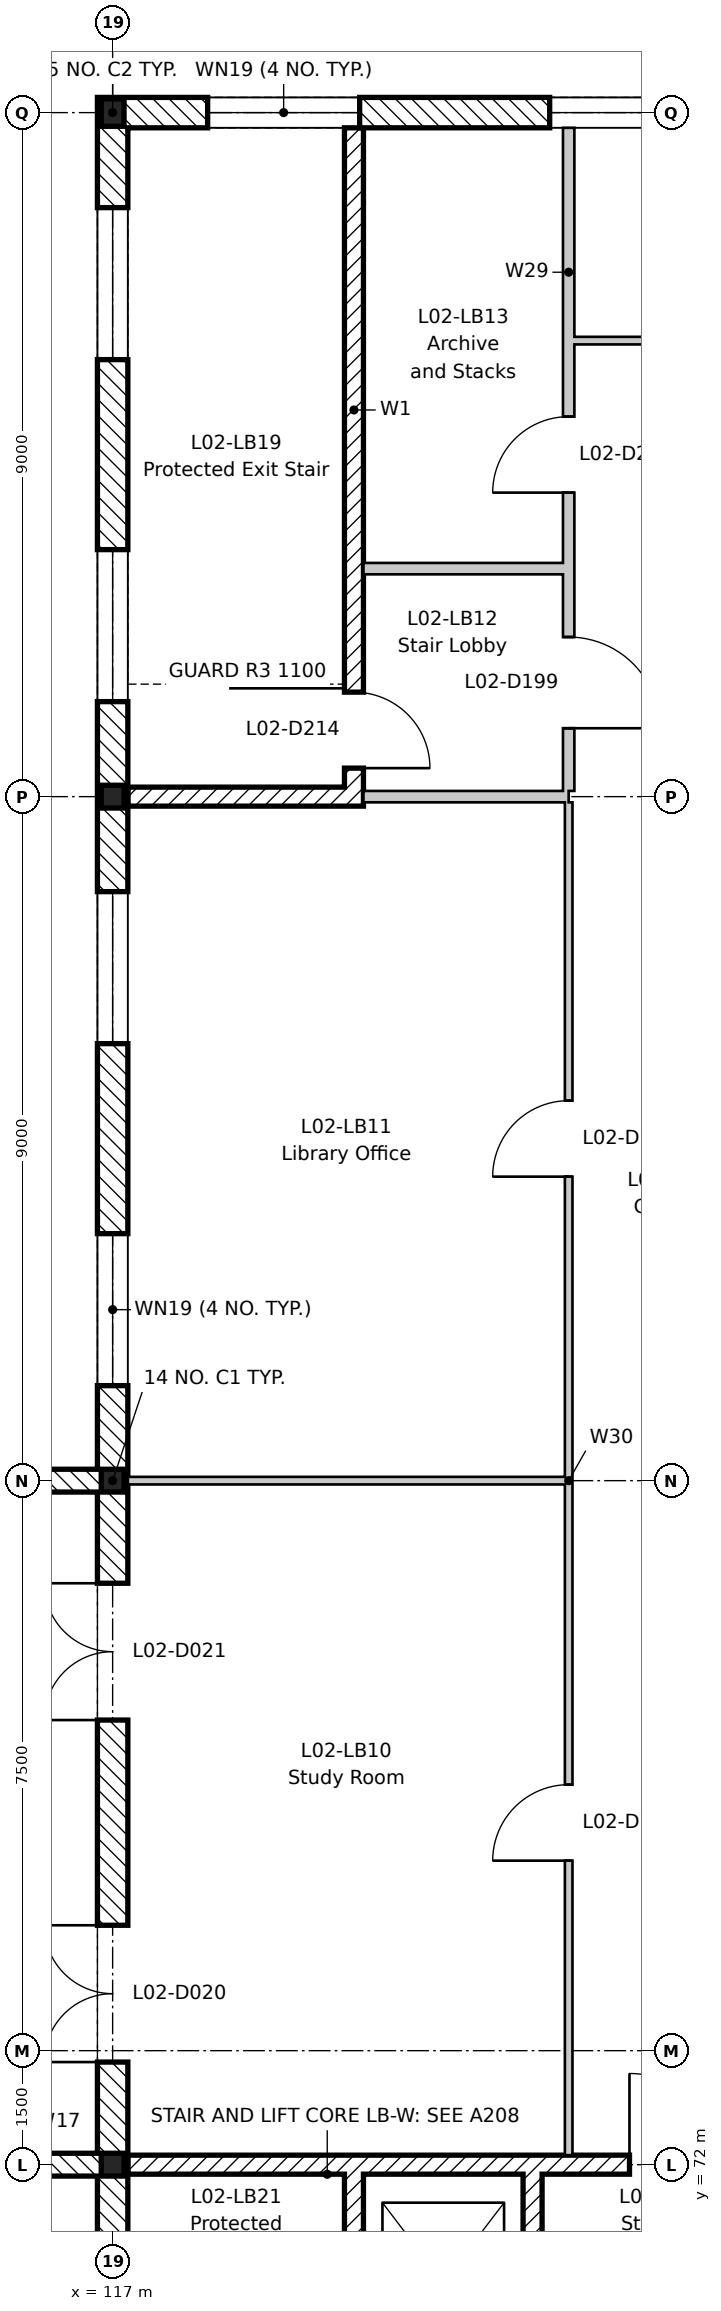
"""IFC4 building model, lengths in metres.
Left out: names, types, materials, properties, quantities, classifications, styles, units other than length and angle.
Written with IfcOpenShell. Run it as: python <this file> out.ifc"""

import sys

from ifc_helpers import new_model, si_unit, direction, frame, frame_2d, origin, origin_2d, place, context, subcontext, project, spatial, rectangle, i_section, extrude, element, fill, save


model = new_model("IFC4")
c1 = context("Model", 3, precision=1e-05, world=origin(), true_north=direction((0.0, 1.0)))
c2 = subcontext(c1, "Body", "Model", "MODEL_VIEW")
j1 = project(units=[si_unit("LENGTHUNIT", "METRE"), si_unit("PLANEANGLEUNIT", "RADIAN")], contexts=[c1])
p1 = place(None, origin())
s1 = spatial("IfcSite", under=j1, at=p1, CompositionType="ELEMENT")
p2 = place(p1, origin())
s2 = spatial("IfcBuilding", under=s1, at=p2, CompositionType="ELEMENT")
p3 = place(p2, frame((0.0, 0.0, 9.9)))
s3 = spatial("IfcBuildingStorey", under=s2, at=p3, CompositionType="ELEMENT", Elevation=9.9)
for number, where, z_axis, x_axis in (
    (1, (117.0, 72.0, -0.2), (0.0, 0.0, 1.0), (1.0, 0.0, 0.0)),
    (2, (117.0, 81.0, -0.2), (0.0, 0.0, 1.0), (1.0, 0.0, 0.0)),
    (3, (117.0, 90.0, -0.2), (0.0, 0.0, 1.0), (1.0, 0.0, 0.0)),
):
    element("IfcColumn", number, at=place(p3, frame(where, z_axis=z_axis, x_axis=x_axis)), inside=s3, PredefinedType="COLUMN", context=c2, shape_type="SweptSolid", body=[
        extrude(i_section(OverallWidth=0.3, OverallDepth=0.3, WebThickness=0.011, FlangeThickness=0.019, FilletRadius=0.027, at=origin_2d()), origin(), (0.0, 0.0, 1.0), 4.45),
    ])
p4 = place(p3, frame((117.0, 99.0, -0.2), z_axis=(0.0, 0.0, 1.0), x_axis=(1.0, 0.0, 0.0)))
e4 = element("IfcColumn", 4, at=p4, inside=s3, PredefinedType="COLUMN", context=c2, shape_type="SweptSolid", body=[
    extrude(i_section(OverallWidth=0.3, OverallDepth=0.36, WebThickness=0.012, FlangeThickness=0.022, FilletRadius=0.027, at=origin_2d()), origin(), (0.0, 0.0, 1.0), 4.45),
])
p5 = place(p3, frame((120.175, 63.2, 0.0), z_axis=(0.0, 0.0, 1.0), x_axis=(0.0, 1.0, 0.0)))
e5 = element("IfcWall", 5, at=p5, inside=s3, PredefinedType="SHEAR", context=c2, shape_type="SweptSolid", body=[
    extrude(rectangle(XDim=8.675, YDim=0.25, at=frame_2d((4.337, 0.0))), origin(), (0.0, 0.0, 1.0), 4.25),
])
p6 = place(p5, frame((0.25, 0.0, 0.0)))
e6 = element("IfcOpeningElement", 6, at=p6, cuts=e5, PredefinedType="OPENING", context=c2, shape_type="SweptSolid", body=[
    extrude(rectangle(XDim=1.0, YDim=2.1, at=frame_2d((0.5, 1.05))), frame((0.0, 0.135, 0.0), z_axis=(0.0, -1.0, 0.0), x_axis=(1.0, 0.0, 0.0)), (0.0, 0.0, 1.0), 0.27),
])
p7 = place(p3, frame((117.2, 72.0, 0.0), z_axis=(0.0, 0.0, 1.0), x_axis=(1.0, 0.0, 0.0)))
e7 = element("IfcWall", 7, at=p7, inside=s3, PredefinedType="SHEAR", context=c2, shape_type="SweptSolid", body=[
    extrude(rectangle(XDim=8.65, YDim=0.25, at=frame_2d((4.325, 0.0))), origin(), (0.0, 0.0, 1.0), 4.25),
])
p8 = place(p7, frame((6.6, 0.0, 0.0)))
e8 = element("IfcOpeningElement", 8, at=p8, cuts=e7, PredefinedType="OPENING", context=c2, shape_type="SweptSolid", body=[
    extrude(rectangle(XDim=1.2, YDim=2.1, at=frame_2d((0.6, 1.05))), frame((0.0, 0.135, 0.0), z_axis=(0.0, -1.0, 0.0), x_axis=(1.0, 0.0, 0.0)), (0.0, 0.0, 1.0), 0.27),
])
p9 = place(p3, frame((122.525, 69.275, 0.0), z_axis=(0.0, 0.0, 1.0), x_axis=(0.0, 1.0, 0.0)))
e9 = element("IfcWall", 9, at=p9, inside=s3, PredefinedType="SHEAR", context=c2, shape_type="SweptSolid", body=[
    extrude(rectangle(XDim=2.6, YDim=0.25, at=frame_2d((1.3, 0.0))), origin(), (0.0, 0.0, 1.0), 4.25),
])
p10 = place(p3, frame((120.175, 90.125, 0.0), z_axis=(0.0, 0.0, 1.0), x_axis=(0.0, 1.0, 0.0)))
e10 = element("IfcWall", 10, at=p10, inside=s3, PredefinedType="SHEAR", context=c2, shape_type="SweptSolid", body=[
    extrude(rectangle(XDim=8.675, YDim=0.25, at=frame_2d((4.337, 0.0))), origin(), (0.0, 0.0, 1.0), 4.25),
])
p11 = place(p10, frame((0.25, 0.0, 0.0)))
e11 = element("IfcOpeningElement", 11, at=p11, cuts=e10, PredefinedType="OPENING", context=c2, shape_type="SweptSolid", body=[
    extrude(rectangle(XDim=1.0, YDim=2.1, at=frame_2d((0.5, 1.05))), frame((0.0, 0.135, 0.0), z_axis=(0.0, -1.0, 0.0), x_axis=(1.0, 0.0, 0.0)), (0.0, 0.0, 1.0), 0.27),
])
p12 = place(p3, frame((117.2, 90.0, 0.0), z_axis=(0.0, 0.0, 1.0), x_axis=(1.0, 0.0, 0.0)))
e12 = element("IfcWall", 12, at=p12, inside=s3, PredefinedType="SHEAR", context=c2, shape_type="SweptSolid", body=[
    extrude(rectangle(XDim=3.1, YDim=0.25, at=frame_2d((1.55, 0.0))), origin(), (0.0, 0.0, 1.0), 4.25),
])
for number, where, z_axis, x_axis in (
    (13, (116.85, 72.0, 0.0), (0.0, 0.0, 1.0), (-1.0, 0.0, 0.0)),
    (14, (116.85, 81.0, 0.0), (0.0, 0.0, 1.0), (-1.0, 0.0, 0.0)),
):
    element("IfcWall", number, at=place(p3, frame(where, z_axis=z_axis, x_axis=x_axis)), inside=s3, PredefinedType="STANDARD", context=c2, shape_type="SweptSolid", body=[
        extrude(rectangle(XDim=2.25, YDim=0.3, at=frame_2d((1.125, 0.0))), origin(), (0.0, 0.0, 1.0), 3.97),
    ])
p13 = place(p3, frame((116.8, 99.0, 0.0), z_axis=(0.0, 0.0, 1.0), x_axis=(1.0, 0.0, 0.0)))
e15 = element("IfcWall", 15, at=p13, inside=s3, PredefinedType="STANDARD", context=c2, shape_type="SweptSolid", body=[
    extrude(rectangle(XDim=54.4, YDim=0.4, at=frame_2d((27.2, 0.0))), origin(), (0.0, 0.0, 1.0), 4.25),
])
p14 = place(p13, frame((1.45, 0.0, 0.5)))
e16 = element("IfcOpeningElement", 16, at=p14, cuts=e15, PredefinedType="OPENING", context=c2, shape_type="SweptSolid", body=[
    extrude(rectangle(XDim=2.0, YDim=3.2, at=frame_2d((1.0, 1.6))), frame((0.0, 0.21, 0.0), z_axis=(0.0, -1.0, 0.0), x_axis=(1.0, 0.0, 0.0)), (0.0, 0.0, 1.0), 0.42),
])
p15 = place(p13, frame((5.95, 0.0, 0.5)))
e17 = element("IfcOpeningElement", 17, at=p15, cuts=e15, PredefinedType="OPENING", context=c2, shape_type="SweptSolid", body=[
    extrude(rectangle(XDim=2.0, YDim=3.2, at=frame_2d((1.0, 1.6))), frame((0.0, 0.21, 0.0), z_axis=(0.0, -1.0, 0.0), x_axis=(1.0, 0.0, 0.0)), (0.0, 0.0, 1.0), 0.42),
])
p16 = place(p13, frame((10.45, 0.0, 0.5)))
e18 = element("IfcOpeningElement", 18, at=p16, cuts=e15, PredefinedType="OPENING", context=c2, shape_type="SweptSolid", body=[
    extrude(rectangle(XDim=2.0, YDim=3.2, at=frame_2d((1.0, 1.6))), frame((0.0, 0.21, 0.0), z_axis=(0.0, -1.0, 0.0), x_axis=(1.0, 0.0, 0.0)), (0.0, 0.0, 1.0), 0.42),
])
p17 = place(p13, frame((14.95, 0.0, 0.5)))
e19 = element("IfcOpeningElement", 19, at=p17, cuts=e15, PredefinedType="OPENING", context=c2, shape_type="SweptSolid", body=[
    extrude(rectangle(XDim=2.0, YDim=3.2, at=frame_2d((1.0, 1.6))), frame((0.0, 0.21, 0.0), z_axis=(0.0, -1.0, 0.0), x_axis=(1.0, 0.0, 0.0)), (0.0, 0.0, 1.0), 0.42),
])
p18 = place(p13, frame((28.45, 0.0, 0.5)))
e20 = element("IfcOpeningElement", 20, at=p18, cuts=e15, PredefinedType="OPENING", context=c2, shape_type="SweptSolid", body=[
    extrude(rectangle(XDim=2.0, YDim=3.2, at=frame_2d((1.0, 1.6))), frame((0.0, 0.21, 0.0), z_axis=(0.0, -1.0, 0.0), x_axis=(1.0, 0.0, 0.0)), (0.0, 0.0, 1.0), 0.42),
])
p19 = place(p13, frame((32.95, 0.0, 0.5)))
e21 = element("IfcOpeningElement", 21, at=p19, cuts=e15, PredefinedType="OPENING", context=c2, shape_type="SweptSolid", body=[
    extrude(rectangle(XDim=2.0, YDim=3.2, at=frame_2d((1.0, 1.6))), frame((0.0, 0.21, 0.0), z_axis=(0.0, -1.0, 0.0), x_axis=(1.0, 0.0, 0.0)), (0.0, 0.0, 1.0), 0.42),
])
p20 = place(p13, frame((37.45, 0.0, 0.5)))
e22 = element("IfcOpeningElement", 22, at=p20, cuts=e15, PredefinedType="OPENING", context=c2, shape_type="SweptSolid", body=[
    extrude(rectangle(XDim=2.0, YDim=3.2, at=frame_2d((1.0, 1.6))), frame((0.0, 0.21, 0.0), z_axis=(0.0, -1.0, 0.0), x_axis=(1.0, 0.0, 0.0)), (0.0, 0.0, 1.0), 0.42),
])
p21 = place(p13, frame((41.95, 0.0, 0.5)))
e23 = element("IfcOpeningElement", 23, at=p21, cuts=e15, PredefinedType="OPENING", context=c2, shape_type="SweptSolid", body=[
    extrude(rectangle(XDim=2.0, YDim=3.2, at=frame_2d((1.0, 1.6))), frame((0.0, 0.21, 0.0), z_axis=(0.0, -1.0, 0.0), x_axis=(1.0, 0.0, 0.0)), (0.0, 0.0, 1.0), 0.42),
])
p22 = place(p13, frame((19.55, 0.0, 0.0)))
e24 = element("IfcOpeningElement", 24, at=p22, cuts=e15, PredefinedType="OPENING", context=c2, shape_type="SweptSolid", body=[
    extrude(rectangle(XDim=1.8, YDim=2.4, at=frame_2d((0.9, 1.2))), frame((0.0, 0.21, 0.0), z_axis=(0.0, -1.0, 0.0), x_axis=(1.0, 0.0, 0.0)), (0.0, 0.0, 1.0), 0.42),
])
p23 = place(p13, frame((24.05, 0.0, 0.0)))
e25 = element("IfcOpeningElement", 25, at=p23, cuts=e15, PredefinedType="OPENING", context=c2, shape_type="SweptSolid", body=[
    extrude(rectangle(XDim=1.8, YDim=2.4, at=frame_2d((0.9, 1.2))), frame((0.0, 0.21, 0.0), z_axis=(0.0, -1.0, 0.0), x_axis=(1.0, 0.0, 0.0)), (0.0, 0.0, 1.0), 0.42),
])
p24 = place(p3, frame((117.0, 63.2, 0.0), z_axis=(0.0, 0.0, 1.0), x_axis=(0.0, 1.0, 0.0)))
e26 = element("IfcWall", 26, at=p24, inside=s3, PredefinedType="STANDARD", context=c2, shape_type="SweptSolid", body=[
    extrude(rectangle(XDim=35.6, YDim=0.4, at=frame_2d((17.8, 0.0))), origin(), (0.0, 0.0, 1.0), 4.25),
])
p25 = place(p24, frame((19.05, 0.0, 0.5)))
e27 = element("IfcOpeningElement", 27, at=p25, cuts=e26, PredefinedType="OPENING", context=c2, shape_type="SweptSolid", body=[
    extrude(rectangle(XDim=2.0, YDim=3.2, at=frame_2d((1.0, 1.6))), frame((0.0, 0.21, 0.0), z_axis=(0.0, -1.0, 0.0), x_axis=(1.0, 0.0, 0.0)), (0.0, 0.0, 1.0), 0.42),
])
p26 = place(p24, frame((23.55, 0.0, 0.5)))
e28 = element("IfcOpeningElement", 28, at=p26, cuts=e26, PredefinedType="OPENING", context=c2, shape_type="SweptSolid", body=[
    extrude(rectangle(XDim=2.0, YDim=3.2, at=frame_2d((1.0, 1.6))), frame((0.0, 0.21, 0.0), z_axis=(0.0, -1.0, 0.0), x_axis=(1.0, 0.0, 0.0)), (0.0, 0.0, 1.0), 0.42),
])
p27 = place(p24, frame((28.05, 0.0, 0.5)))
e29 = element("IfcOpeningElement", 29, at=p27, cuts=e26, PredefinedType="OPENING", context=c2, shape_type="SweptSolid", body=[
    extrude(rectangle(XDim=2.0, YDim=3.2, at=frame_2d((1.0, 1.6))), frame((0.0, 0.21, 0.0), z_axis=(0.0, -1.0, 0.0), x_axis=(1.0, 0.0, 0.0)), (0.0, 0.0, 1.0), 0.42),
])
p28 = place(p24, frame((32.55, 0.0, 0.5)))
e30 = element("IfcOpeningElement", 30, at=p28, cuts=e26, PredefinedType="OPENING", context=c2, shape_type="SweptSolid", body=[
    extrude(rectangle(XDim=2.0, YDim=3.2, at=frame_2d((1.0, 1.6))), frame((0.0, 0.21, 0.0), z_axis=(0.0, -1.0, 0.0), x_axis=(1.0, 0.0, 0.0)), (0.0, 0.0, 1.0), 0.42),
])
p29 = place(p24, frame((10.15, 0.0, 0.0)))
e31 = element("IfcOpeningElement", 31, at=p29, cuts=e26, PredefinedType="OPENING", context=c2, shape_type="SweptSolid", body=[
    extrude(rectangle(XDim=1.8, YDim=2.4, at=frame_2d((0.9, 1.2))), frame((0.0, 0.21, 0.0), z_axis=(0.0, -1.0, 0.0), x_axis=(1.0, 0.0, 0.0)), (0.0, 0.0, 1.0), 0.42),
])
p30 = place(p24, frame((14.65, 0.0, 0.0)))
e32 = element("IfcOpeningElement", 32, at=p30, cuts=e26, PredefinedType="OPENING", context=c2, shape_type="SweptSolid", body=[
    extrude(rectangle(XDim=1.8, YDim=2.4, at=frame_2d((0.9, 1.2))), frame((0.0, 0.21, 0.0), z_axis=(0.0, -1.0, 0.0), x_axis=(1.0, 0.0, 0.0)), (0.0, 0.0, 1.0), 0.42),
])
p31 = place(p3, frame((117.2, 81.0, 0.0), z_axis=(0.0, 0.0, 1.0), x_axis=(1.0, 0.0, 0.0)))
e33 = element("IfcWall", 33, at=p31, inside=s3, PredefinedType="PARTITIONING", context=c2, shape_type="SweptSolid", body=[
    extrude(rectangle(XDim=5.75, YDim=0.1, at=frame_2d((2.875, 0.0))), origin(), (0.0, 0.0, 1.0), 4.25),
])
p32 = place(p3, frame((120.3, 90.0, 0.0), z_axis=(0.0, 0.0, 1.0), x_axis=(1.0, 0.0, 0.0)))
e34 = element("IfcWall", 34, at=p32, inside=s3, PredefinedType="PARTITIONING", context=c2, shape_type="SweptSolid", body=[
    extrude(rectangle(XDim=2.7, YDim=0.15, at=frame_2d((1.35, 0.0))), origin(), (0.0, 0.0, 1.0), 4.25),
])
p33 = place(p3, frame((120.3, 93.0, 0.0), z_axis=(0.0, 0.0, 1.0), x_axis=(1.0, 0.0, 0.0)))
e35 = element("IfcWall", 35, at=p33, inside=s3, PredefinedType="PARTITIONING", context=c2, shape_type="SweptSolid", body=[
    extrude(rectangle(XDim=2.625, YDim=0.15, at=frame_2d((1.312, 0.0))), origin(), (0.0, 0.0, 1.0), 4.25),
])
p34 = place(p3, frame((123.075, 96.0, 0.0), z_axis=(0.0, 0.0, 1.0), x_axis=(1.0, 0.0, 0.0)))
e36 = element("IfcWall", 36, at=p34, inside=s3, PredefinedType="PARTITIONING", context=c2, shape_type="SweptSolid", body=[
    extrude(rectangle(XDim=23.925, YDim=0.1, at=frame_2d((11.962, 0.0))), origin(), (0.0, 0.0, 1.0), 4.25),
])
p35 = place(p34, frame((5.425, 0.0, 0.0)))
e37 = element("IfcOpeningElement", 37, at=p35, cuts=e36, PredefinedType="OPENING", context=c2, shape_type="SweptSolid", body=[
    extrude(rectangle(XDim=1.0, YDim=2.1, at=frame_2d((0.5, 1.05))), frame((0.0, 0.06, 0.0), z_axis=(0.0, -1.0, 0.0), x_axis=(1.0, 0.0, 0.0)), (0.0, 0.0, 1.0), 0.12),
])
p36 = place(p34, frame((17.425, 0.0, 0.0)))
e38 = element("IfcOpeningElement", 38, at=p36, cuts=e36, PredefinedType="OPENING", context=c2, shape_type="SweptSolid", body=[
    extrude(rectangle(XDim=1.0, YDim=2.1, at=frame_2d((0.5, 1.05))), frame((0.0, 0.06, 0.0), z_axis=(0.0, -1.0, 0.0), x_axis=(1.0, 0.0, 0.0)), (0.0, 0.0, 1.0), 0.12),
])
p37 = place(p3, frame((123.0, 90.075, 0.0), z_axis=(0.0, 0.0, 1.0), x_axis=(0.0, 1.0, 0.0)))
e39 = element("IfcWall", 39, at=p37, inside=s3, PredefinedType="PARTITIONING", context=c2, shape_type="SweptSolid", body=[
    extrude(rectangle(XDim=8.725, YDim=0.15, at=frame_2d((4.363, 0.0))), origin(), (0.0, 0.0, 1.0), 4.25),
])
p38 = place(p37, frame((0.825, 0.0, 0.0)))
e40 = element("IfcOpeningElement", 40, at=p38, cuts=e39, PredefinedType="OPENING", context=c2, shape_type="SweptSolid", body=[
    extrude(rectangle(XDim=1.2, YDim=2.1, at=frame_2d((0.6, 1.05))), frame((0.0, 0.085, 0.0), z_axis=(0.0, -1.0, 0.0), x_axis=(1.0, 0.0, 0.0)), (0.0, 0.0, 1.0), 0.17),
])
p39 = place(p37, frame((3.925, 0.0, 0.0)))
e41 = element("IfcOpeningElement", 41, at=p39, cuts=e39, PredefinedType="OPENING", context=c2, shape_type="SweptSolid", body=[
    extrude(rectangle(XDim=1.0, YDim=2.1, at=frame_2d((0.5, 1.05))), frame((0.0, 0.085, 0.0), z_axis=(0.0, -1.0, 0.0), x_axis=(1.0, 0.0, 0.0)), (0.0, 0.0, 1.0), 0.17),
])
p40 = place(p3, frame((123.0, 72.125, 0.0), z_axis=(0.0, 0.0, 1.0), x_axis=(0.0, 1.0, 0.0)))
e42 = element("IfcWall", 42, at=p40, inside=s3, PredefinedType="PARTITIONING", context=c2, shape_type="SweptSolid", body=[
    extrude(rectangle(XDim=17.8, YDim=0.1, at=frame_2d((8.9, 0.0))), origin(), (0.0, 0.0, 1.0), 4.25),
])
p41 = place(p40, frame((3.875, 0.0, 0.0)))
e43 = element("IfcOpeningElement", 43, at=p41, cuts=e42, PredefinedType="OPENING", context=c2, shape_type="SweptSolid", body=[
    extrude(rectangle(XDim=1.0, YDim=2.1, at=frame_2d((0.5, 1.05))), frame((0.0, 0.06, 0.0), z_axis=(0.0, -1.0, 0.0), x_axis=(1.0, 0.0, 0.0)), (0.0, 0.0, 1.0), 0.12),
])
p42 = place(p40, frame((12.875, 0.0, 0.0)))
e44 = element("IfcOpeningElement", 44, at=p42, cuts=e42, PredefinedType="OPENING", context=c2, shape_type="SweptSolid", body=[
    extrude(rectangle(XDim=1.0, YDim=2.1, at=frame_2d((0.5, 1.05))), frame((0.0, 0.06, 0.0), z_axis=(0.0, -1.0, 0.0), x_axis=(1.0, 0.0, 0.0)), (0.0, 0.0, 1.0), 0.12),
])
p43 = place(p14, origin())
e45 = element("IfcWindow", 45, at=p43, inside=s3, PartitioningType="SINGLE_PANEL", PredefinedType="WINDOW", context=c2, shape_type="SweptSolid", body=[
    extrude(rectangle(XDim=2.0, YDim=3.2, at=frame_2d((1.0, 1.6))), frame((0.0, 0.03, 0.0), z_axis=(0.0, -1.0, 0.0), x_axis=(1.0, 0.0, 0.0)), (0.0, 0.0, 1.0), 0.06),
])
fill(e16, e45)
p44 = place(p15, origin())
e46 = element("IfcWindow", 46, at=p44, inside=s3, PartitioningType="SINGLE_PANEL", PredefinedType="WINDOW", context=c2, shape_type="SweptSolid", body=[
    extrude(rectangle(XDim=2.0, YDim=3.2, at=frame_2d((1.0, 1.6))), frame((0.0, 0.03, 0.0), z_axis=(0.0, -1.0, 0.0), x_axis=(1.0, 0.0, 0.0)), (0.0, 0.0, 1.0), 0.06),
])
fill(e17, e46)
p45 = place(p25, origin())
e47 = element("IfcWindow", 47, at=p45, inside=s3, PartitioningType="SINGLE_PANEL", PredefinedType="WINDOW", context=c2, shape_type="SweptSolid", body=[
    extrude(rectangle(XDim=2.0, YDim=3.2, at=frame_2d((1.0, 1.6))), frame((0.0, 0.03, 0.0), z_axis=(0.0, -1.0, 0.0), x_axis=(1.0, 0.0, 0.0)), (0.0, 0.0, 1.0), 0.06),
])
fill(e27, e47)
p46 = place(p26, origin())
e48 = element("IfcWindow", 48, at=p46, inside=s3, PartitioningType="SINGLE_PANEL", PredefinedType="WINDOW", context=c2, shape_type="SweptSolid", body=[
    extrude(rectangle(XDim=2.0, YDim=3.2, at=frame_2d((1.0, 1.6))), frame((0.0, 0.03, 0.0), z_axis=(0.0, -1.0, 0.0), x_axis=(1.0, 0.0, 0.0)), (0.0, 0.0, 1.0), 0.06),
])
fill(e28, e48)
p47 = place(p27, origin())
e49 = element("IfcWindow", 49, at=p47, inside=s3, PartitioningType="SINGLE_PANEL", PredefinedType="WINDOW", context=c2, shape_type="SweptSolid", body=[
    extrude(rectangle(XDim=2.0, YDim=3.2, at=frame_2d((1.0, 1.6))), frame((0.0, 0.03, 0.0), z_axis=(0.0, -1.0, 0.0), x_axis=(1.0, 0.0, 0.0)), (0.0, 0.0, 1.0), 0.06),
])
fill(e29, e49)
p48 = place(p28, origin())
e50 = element("IfcWindow", 50, at=p48, inside=s3, PartitioningType="SINGLE_PANEL", PredefinedType="WINDOW", context=c2, shape_type="SweptSolid", body=[
    extrude(rectangle(XDim=2.0, YDim=3.2, at=frame_2d((1.0, 1.6))), frame((0.0, 0.03, 0.0), z_axis=(0.0, -1.0, 0.0), x_axis=(1.0, 0.0, 0.0)), (0.0, 0.0, 1.0), 0.06),
])
fill(e30, e50)
p49 = place(p29, origin())
e51 = element("IfcDoor", 51, at=p49, inside=s3, OperationType="DOUBLE_DOOR_SINGLE_SWING", PredefinedType="DOOR", context=c2, shape_type="SweptSolid", body=[
    extrude(rectangle(XDim=1.8, YDim=2.4, at=frame_2d((0.9, 1.2))), frame((0.0, 0.025, 0.0), z_axis=(0.0, -1.0, 0.0), x_axis=(1.0, 0.0, 0.0)), (0.0, 0.0, 1.0), 0.05),
])
fill(e31, e51)
p50 = place(p30, origin())
e52 = element("IfcDoor", 52, at=p50, inside=s3, OperationType="DOUBLE_DOOR_SINGLE_SWING", PredefinedType="DOOR", context=c2, shape_type="SweptSolid", body=[
    extrude(rectangle(XDim=1.8, YDim=2.4, at=frame_2d((0.9, 1.2))), frame((0.0, 0.025, 0.0), z_axis=(0.0, -1.0, 0.0), x_axis=(1.0, 0.0, 0.0)), (0.0, 0.0, 1.0), 0.05),
])
fill(e32, e52)
p51 = place(p41, origin())
e53 = element("IfcDoor", 53, at=p51, inside=s3, OperationType="SINGLE_SWING_LEFT", PredefinedType="DOOR", context=c2, shape_type="SweptSolid", body=[
    extrude(rectangle(XDim=1.0, YDim=2.1, at=frame_2d((0.5, 1.05))), frame((0.0, 0.025, 0.0), z_axis=(0.0, -1.0, 0.0), x_axis=(1.0, 0.0, 0.0)), (0.0, 0.0, 1.0), 0.05),
])
fill(e43, e53)
p52 = place(p42, origin())
e54 = element("IfcDoor", 54, at=p52, inside=s3, OperationType="SINGLE_SWING_LEFT", PredefinedType="DOOR", context=c2, shape_type="SweptSolid", body=[
    extrude(rectangle(XDim=1.0, YDim=2.1, at=frame_2d((0.5, 1.05))), frame((0.0, 0.025, 0.0), z_axis=(0.0, -1.0, 0.0), x_axis=(1.0, 0.0, 0.0)), (0.0, 0.0, 1.0), 0.05),
])
fill(e44, e54)
p53 = place(p38, frame((1.2, 0.0, 0.0), z_axis=(0.0, 0.0, 1.0), x_axis=(-1.0, 0.0, 0.0)))
e55 = element("IfcDoor", 55, at=p53, inside=s3, OperationType="SINGLE_SWING_RIGHT", PredefinedType="DOOR", context=c2, shape_type="SweptSolid", body=[
    extrude(rectangle(XDim=1.2, YDim=2.1, at=frame_2d((0.6, 1.05))), frame((0.0, 0.025, 0.0), z_axis=(0.0, -1.0, 0.0), x_axis=(1.0, 0.0, 0.0)), (0.0, 0.0, 1.0), 0.05),
])
fill(e40, e55)
p54 = place(p39, origin())
e56 = element("IfcDoor", 56, at=p54, inside=s3, OperationType="SINGLE_SWING_LEFT", PredefinedType="DOOR", context=c2, shape_type="SweptSolid", body=[
    extrude(rectangle(XDim=1.0, YDim=2.1, at=frame_2d((0.5, 1.05))), frame((0.0, 0.025, 0.0), z_axis=(0.0, -1.0, 0.0), x_axis=(1.0, 0.0, 0.0)), (0.0, 0.0, 1.0), 0.05),
])
fill(e41, e56)
p55 = place(p8, origin())
e57 = element("IfcDoor", 57, at=p55, inside=s3, OperationType="SINGLE_SWING_LEFT", PredefinedType="DOOR", context=c2, shape_type="SweptSolid", body=[
    extrude(rectangle(XDim=1.2, YDim=2.1, at=frame_2d((0.6, 1.05))), frame((0.0, 0.025, 0.0), z_axis=(0.0, -1.0, 0.0), x_axis=(1.0, 0.0, 0.0)), (0.0, 0.0, 1.0), 0.05),
])
fill(e8, e57)
p56 = place(p11, frame((1.0, 0.0, 0.0), z_axis=(0.0, 0.0, 1.0), x_axis=(-1.0, 0.0, 0.0)))
e58 = element("IfcDoor", 58, at=p56, inside=s3, OperationType="SINGLE_SWING_RIGHT", PredefinedType="DOOR", context=c2, shape_type="SweptSolid", body=[
    extrude(rectangle(XDim=1.0, YDim=2.1, at=frame_2d((0.5, 1.05))), frame((0.0, 0.025, 0.0), z_axis=(0.0, -1.0, 0.0), x_axis=(1.0, 0.0, 0.0)), (0.0, 0.0, 1.0), 0.05),
])
fill(e11, e58)
save(model, sys.argv[1])
